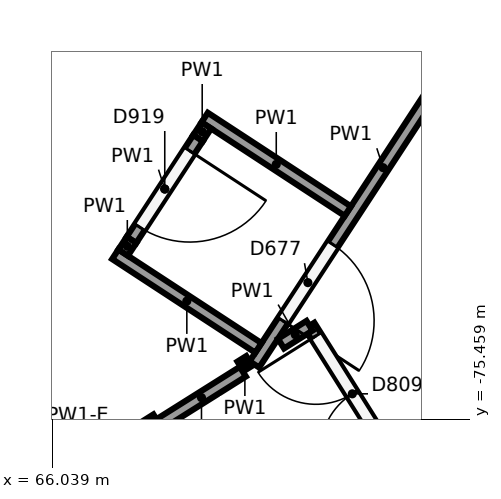
"""IFC4 building model, lengths in metres.
Left out: names, types, materials, properties, quantities, classifications, styles, units other than length and angle.
Written with IfcOpenShell. Run it as: python <this file> out.ifc"""

import sys

from ifc_helpers import new_model, si_unit, direction, frame, frame_2d, origin, place, context, subcontext, project, spatial, rectangle, extrude, element, fill, save


model = new_model("IFC4")
c1 = context("Model", 3, precision=1e-05, world=origin(), true_north=direction((0.0, 1.0)))
c2 = subcontext(c1, "Body", "Model", "MODEL_VIEW")
j1 = project(units=[si_unit("LENGTHUNIT", "METRE"), si_unit("PLANEANGLEUNIT", "RADIAN")], contexts=[c1])
p1 = place(None, origin())
s1 = spatial("IfcSite", under=j1, at=p1, CompositionType="ELEMENT")
p2 = place(p1, origin())
s2 = spatial("IfcBuilding", under=s1, at=p2, CompositionType="ELEMENT")
p3 = place(p2, frame((0.0, 0.0, 6.5)))
s3 = spatial("IfcBuildingStorey", under=s2, at=p3, CompositionType="ELEMENT", Elevation=6.5)
p4 = place(p3, frame((72.085, -69.559, 0.0), z_axis=(0.0, 0.0, 1.0), x_axis=(-0.547328054804, -0.836918156348, 0.0)))
e1 = element("IfcWall", 1, at=p4, inside=s3, PredefinedType="PARTITIONING", context=c2, shape_type="SweptSolid", body=[
    extrude(rectangle(XDim=6.186, YDim=0.15, at=frame_2d((3.093, 0.0))), origin(), (0.0, 0.0, 1.0), 5.15),
])
p5 = place(p4, frame((4.3, 0.0, 0.0)))
e2 = element("IfcOpeningElement", 2, at=p5, cuts=e1, PredefinedType="OPENING", context=c2, shape_type="SweptSolid", body=[
    extrude(rectangle(XDim=1.2, YDim=2.1, at=frame_2d((0.6, 1.05))), frame((0.0, 0.085, 0.0), z_axis=(0.0, -1.0, 0.0), x_axis=(1.0, 0.0, 0.0)), (0.0, 0.0, 1.0), 0.17),
])
p6 = place(p3, frame((68.548, -74.832, 0.0), z_axis=(0.0, 0.0, 1.0), x_axis=(-0.846736781525, -0.53201205138, 0.0)))
e3 = element("IfcWall", 3, at=p6, inside=s3, PredefinedType="PARTITIONING", context=c2, shape_type="SweptSolid", body=[
    extrude(rectangle(XDim=1.285, YDim=0.15, at=frame_2d((0.643, 0.0))), origin(), (0.0, 0.0, 1.0), 5.15),
])
p7 = place(p3, frame((68.633, -74.69, 0.0), z_axis=(0.0, 0.0, 1.0), x_axis=(-0.846796817222, -0.531916488129, 0.0)))
e4 = element("IfcWall", 4, at=p7, inside=s3, PredefinedType="PARTITIONING", context=c2, shape_type="SweptSolid", body=[
    extrude(rectangle(XDim=0.137, YDim=0.15, at=frame_2d((0.069, 0.0))), origin(), (0.0, 0.0, 1.0), 5.15),
])
p8 = place(p3, frame((67.411, -75.457, 0.0), z_axis=(0.0, 0.0, 1.0), x_axis=(-0.846666992422, -0.532123109762, 0.0)))
e5 = element("IfcWall", 5, at=p8, inside=s3, PredefinedType="PARTITIONING", context=c2, shape_type="SweptSolid", body=[
    extrude(rectangle(XDim=1.445, YDim=0.15, at=frame_2d((0.723, 0.0))), origin(), (0.0, 0.0, 1.0), 4.05),
])
p9 = place(p3, frame((72.143, -78.552, 0.0), z_axis=(0.0, 0.0, 1.0), x_axis=(-0.532063867314, 0.846704222913, 0.0)))
e6 = element("IfcWall", 6, at=p9, inside=s3, PredefinedType="PARTITIONING", context=c2, shape_type="SweptSolid", body=[
    extrude(rectangle(XDim=5.108, YDim=0.15, at=frame_2d((2.554, 0.0))), origin(), (0.0, 0.0, 1.0), 4.05),
])
p10 = place(p9, frame((3.15, 0.0, 0.0)))
e7 = element("IfcOpeningElement", 7, at=p10, cuts=e6, PredefinedType="OPENING", context=c2, shape_type="SweptSolid", body=[
    extrude(rectangle(XDim=1.8, YDim=2.1, at=frame_2d((0.9, 1.05))), frame((0.0, 0.085, 0.0), z_axis=(0.0, -1.0, 0.0), x_axis=(1.0, 0.0, 0.0)), (0.0, 0.0, 1.0), 0.17),
])
p11 = place(p9, frame((0.05, 0.0, 0.0)))
e8 = element("IfcOpeningElement", 8, at=p11, cuts=e6, PredefinedType="OPENING", context=c2, shape_type="SweptSolid", body=[
    extrude(rectangle(XDim=1.8, YDim=2.1, at=frame_2d((0.9, 1.05))), frame((0.0, 0.085, 0.0), z_axis=(0.0, -1.0, 0.0), x_axis=(1.0, 0.0, 0.0)), (0.0, 0.0, 1.0), 0.17),
])
p12 = place(p3, frame((69.425, -74.227, 0.0), z_axis=(0.0, 0.0, 1.0), x_axis=(-0.846757169089, -0.531979601674, 0.0)))
e9 = element("IfcWall", 9, at=p12, inside=s3, PredefinedType="PARTITIONING", context=c2, shape_type="SweptSolid", body=[
    extrude(rectangle(XDim=0.443, YDim=0.15, at=frame_2d((0.221, 0.0))), origin(), (0.0, 0.0, 1.0), 5.15),
])
for number, where, z_axis, x_axis in (
    (10, (69.929, -72.719, 0.0), (0.0, 0.0, 1.0), (-0.837, 0.547, 0.0)),
    (11, (68.752, -74.519, 0.0), (0.0, 0.0, 1.0), (-0.837, 0.547, 0.0)),
):
    element("IfcWall", number, at=place(p3, frame(where, z_axis=z_axis, x_axis=x_axis)), inside=s3, PredefinedType="PARTITIONING", context=c2, shape_type="SweptSolid", body=[
        extrude(rectangle(XDim=2.25, YDim=0.15, at=frame_2d((1.125, 0.0))), origin(), (0.0, 0.0, 1.0), 5.15),
    ])
p13 = place(p3, frame((68.068, -71.592, 0.0), z_axis=(0.0, 0.0, 1.0), x_axis=(-0.546788900939, -0.837270504562, 0.0)))
e12 = element("IfcWall", 12, at=p13, inside=s3, PredefinedType="PARTITIONING", context=c2, shape_type="SweptSolid", body=[
    extrude(rectangle(XDim=0.2, YDim=0.15, at=frame_2d((0.1, 0.0))), origin(), (0.0, 0.0, 1.0), 5.15),
])
p14 = place(p3, frame((67.958, -71.759, 0.0), z_axis=(0.0, 0.0, 1.0), x_axis=(-0.547319249347, -0.836923914878, 0.0)))
e13 = element("IfcWall", 13, at=p14, inside=s3, PredefinedType="PARTITIONING", context=c2, shape_type="SweptSolid", body=[
    extrude(rectangle(XDim=1.6, YDim=0.15, at=frame_2d((0.8, 0.0))), origin(), (0.0, 0.0, 1.0), 5.15),
])
p15 = place(p14, frame((0.2, 0.0, 0.0)))
e14 = element("IfcOpeningElement", 14, at=p15, cuts=e13, PredefinedType="OPENING", context=c2, shape_type="SweptSolid", body=[
    extrude(rectangle(XDim=1.2, YDim=2.1, at=frame_2d((0.6, 1.05))), frame((0.0, 0.085, 0.0), z_axis=(0.0, -1.0, 0.0), x_axis=(1.0, 0.0, 0.0)), (0.0, 0.0, 1.0), 0.17),
])
p16 = place(p3, frame((67.083, -73.098, 0.0), z_axis=(0.0, 0.0, 1.0), x_axis=(-0.548202987106, -0.836345314405, 0.0)))
e15 = element("IfcWall", 15, at=p16, inside=s3, PredefinedType="PARTITIONING", context=c2, shape_type="SweptSolid", body=[
    extrude(rectangle(XDim=0.2, YDim=0.15, at=frame_2d((0.1, 0.0))), origin(), (0.0, 0.0, 1.0), 5.15),
])
p17 = place(p5, origin())
e16 = element("IfcDoor", 16, at=p17, inside=s3, OperationType="SINGLE_SWING_RIGHT", PredefinedType="DOOR", context=c2, shape_type="SweptSolid", body=[
    extrude(rectangle(XDim=1.2, YDim=2.1, at=frame_2d((0.6, 1.05))), frame((0.0, 0.025, 0.0), z_axis=(0.0, -1.0, 0.0), x_axis=(1.0, 0.0, 0.0)), (0.0, 0.0, 1.0), 0.05),
])
fill(e2, e16)
p18 = place(p10, origin())
e17 = element("IfcDoor", 17, at=p18, inside=s3, OperationType="DOUBLE_DOOR_SINGLE_SWING", PredefinedType="DOOR", context=c2, shape_type="SweptSolid", body=[
    extrude(rectangle(XDim=1.8, YDim=2.1, at=frame_2d((0.9, 1.05))), frame((0.0, 0.025, 0.0), z_axis=(0.0, -1.0, 0.0), x_axis=(1.0, 0.0, 0.0)), (0.0, 0.0, 1.0), 0.05),
])
fill(e7, e17)
p19 = place(p15, origin())
e18 = element("IfcDoor", 18, at=p19, inside=s3, OperationType="SINGLE_SWING_LEFT", PredefinedType="DOOR", context=c2, shape_type="SweptSolid", body=[
    extrude(rectangle(XDim=1.2, YDim=2.1, at=frame_2d((0.6, 1.05))), frame((0.0, 0.025, 0.0), z_axis=(0.0, -1.0, 0.0), x_axis=(1.0, 0.0, 0.0)), (0.0, 0.0, 1.0), 0.05),
])
fill(e14, e18)
save(model, sys.argv[1])
